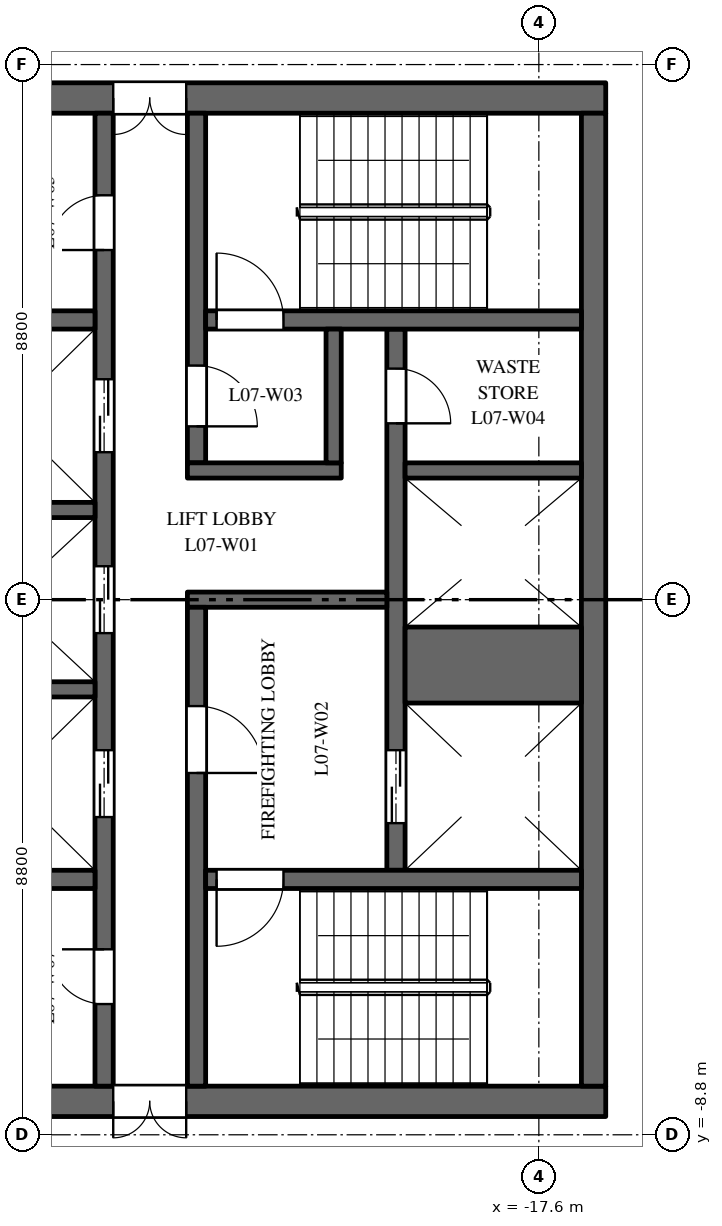
"""IFC4 building model, lengths in metres.
Left out: names, types, materials, properties, quantities, classifications, styles, units other than length and angle.
Written with IfcOpenShell. Run it as: python <this file> out.ifc"""

import sys

from ifc_helpers import new_model, si_unit, direction, frame, frame_2d, origin, place, context, subcontext, project, spatial, rectangle, extrude, element, fill, save


model = new_model("IFC4")
c1 = context("Model", 3, precision=1e-05, world=origin(), true_north=direction((0.0, 1.0)))
c2 = subcontext(c1, "Body", "Model", "MODEL_VIEW")
j1 = project(units=[si_unit("LENGTHUNIT", "METRE"), si_unit("PLANEANGLEUNIT", "RADIAN")], contexts=[c1])
p1 = place(None, origin())
s1 = spatial("IfcSite", under=j1, at=p1, CompositionType="ELEMENT")
p2 = place(p1, origin())
s2 = spatial("IfcBuilding", under=s1, at=p2, CompositionType="ELEMENT")
p3 = place(p2, frame((0.0, 0.0, 38.5)))
s3 = spatial("IfcBuildingStorey", under=s2, at=p3, CompositionType="ELEMENT", Elevation=38.5)
p4 = place(p3, frame((-16.5, 8.25, 0.0), z_axis=(0.0, 0.0, 1.0), x_axis=(-1.0, 0.0, 0.0)))
e1 = element("IfcWall", 1, at=p4, inside=s3, PredefinedType="SHEAR", context=c2, shape_type="SweptSolid", body=[
    extrude(rectangle(XDim=15.0, YDim=0.5, at=frame_2d((7.5, 0.0))), origin(), (0.0, 0.0, 1.0), 3.7),
])
p5 = place(p4, frame((6.9, 0.0, 0.0)))
e2 = element("IfcOpeningElement", 2, at=p5, cuts=e1, PredefinedType="OPENING", context=c2, shape_type="SweptSolid", body=[
    extrude(rectangle(XDim=1.2, YDim=2.1, at=frame_2d((0.6, 1.05))), frame((0.0, 0.26, 0.0), z_axis=(0.0, -1.0, 0.0), x_axis=(1.0, 0.0, 0.0)), (0.0, 0.0, 1.0), 0.52),
])
p6 = place(p4, frame((12.05, 0.0, 0.0)))
e3 = element("IfcOpeningElement", 3, at=p6, cuts=e1, PredefinedType="OPENING", context=c2, shape_type="SweptSolid", body=[
    extrude(rectangle(XDim=0.9, YDim=2.1, at=frame_2d((0.45, 1.05))), frame((0.0, 0.26, 0.0), z_axis=(0.0, -1.0, 0.0), x_axis=(1.0, 0.0, 0.0)), (0.0, 0.0, 1.0), 0.52),
])
p7 = place(p3, frame((-16.5, -8.25, 0.0), z_axis=(0.0, 0.0, 1.0), x_axis=(-1.0, 0.0, 0.0)))
e4 = element("IfcWall", 4, at=p7, inside=s3, PredefinedType="SHEAR", context=c2, shape_type="SweptSolid", body=[
    extrude(rectangle(XDim=15.0, YDim=0.5, at=frame_2d((7.5, 0.0))), origin(), (0.0, 0.0, 1.0), 3.7),
])
p8 = place(p7, frame((6.9, 0.0, 0.0)))
e5 = element("IfcOpeningElement", 5, at=p8, cuts=e4, PredefinedType="OPENING", context=c2, shape_type="SweptSolid", body=[
    extrude(rectangle(XDim=1.2, YDim=2.1, at=frame_2d((0.6, 1.05))), frame((0.0, 0.26, 0.0), z_axis=(0.0, -1.0, 0.0), x_axis=(1.0, 0.0, 0.0)), (0.0, 0.0, 1.0), 0.52),
])
p9 = place(p7, frame((12.05, 0.0, 0.0)))
e6 = element("IfcOpeningElement", 6, at=p9, cuts=e4, PredefinedType="OPENING", context=c2, shape_type="SweptSolid", body=[
    extrude(rectangle(XDim=0.9, YDim=2.1, at=frame_2d((0.45, 1.05))), frame((0.0, 0.26, 0.0), z_axis=(0.0, -1.0, 0.0), x_axis=(1.0, 0.0, 0.0)), (0.0, 0.0, 1.0), 0.52),
])
p10 = place(p3, frame((-19.95, -4.45, 0.0), z_axis=(0.0, 0.0, 1.0), x_axis=(0.0, 1.0, 0.0)))
e7 = element("IfcWall", 7, at=p10, inside=s3, PredefinedType="SHEAR", context=c2, shape_type="SweptSolid", body=[
    extrude(rectangle(XDim=8.9, YDim=0.3, at=frame_2d((4.45, 0.0))), origin(), (0.0, 0.0, 1.0), 3.7),
])
p11 = place(p10, frame((0.775, 0.0, 0.0)))
e8 = element("IfcOpeningElement", 8, at=p11, cuts=e7, PredefinedType="OPENING", context=c2, shape_type="SweptSolid", body=[
    extrude(rectangle(XDim=1.2, YDim=2.1, at=frame_2d((0.6, 1.05))), frame((0.0, 0.16, 0.0), z_axis=(0.0, -1.0, 0.0), x_axis=(1.0, 0.0, 0.0)), (0.0, 0.0, 1.0), 0.32),
])
p12 = place(p10, frame((7.35, 0.0, 0.0)))
e9 = element("IfcOpeningElement", 9, at=p12, cuts=e7, PredefinedType="OPENING", context=c2, shape_type="SweptSolid", body=[
    extrude(rectangle(XDim=0.9, YDim=2.1, at=frame_2d((0.45, 1.05))), frame((0.0, 0.16, 0.0), z_axis=(0.0, -1.0, 0.0), x_axis=(1.0, 0.0, 0.0)), (0.0, 0.0, 1.0), 0.32),
])
p13 = place(p3, frame((-24.75, -8.0, 0.0), z_axis=(0.0, 0.0, 1.0), x_axis=(0.0, 1.0, 0.0)))
e10 = element("IfcWall", 10, at=p13, inside=s3, PredefinedType="SHEAR", context=c2, shape_type="SweptSolid", body=[
    extrude(rectangle(XDim=16.0, YDim=0.3, at=frame_2d((8.0, 0.0))), origin(), (0.0, 0.0, 1.0), 3.7),
])
p14 = place(p13, frame((4.425, 0.0, 0.0)))
e11 = element("IfcOpeningElement", 11, at=p14, cuts=e10, PredefinedType="OPENING", context=c2, shape_type="SweptSolid", body=[
    extrude(rectangle(XDim=1.1, YDim=2.1, at=frame_2d((0.55, 1.05))), frame((0.0, 0.16, 0.0), z_axis=(0.0, -1.0, 0.0), x_axis=(1.0, 0.0, 0.0)), (0.0, 0.0, 1.0), 0.32),
])
p15 = place(p13, frame((7.45, 0.0, 0.0)))
e12 = element("IfcOpeningElement", 12, at=p15, cuts=e10, PredefinedType="OPENING", context=c2, shape_type="SweptSolid", body=[
    extrude(rectangle(XDim=1.1, YDim=2.1, at=frame_2d((0.55, 1.05))), frame((0.0, 0.16, 0.0), z_axis=(0.0, -1.0, 0.0), x_axis=(1.0, 0.0, 0.0)), (0.0, 0.0, 1.0), 0.32),
])
p16 = place(p13, frame((10.425, 0.0, 0.0)))
e13 = element("IfcOpeningElement", 13, at=p16, cuts=e10, PredefinedType="OPENING", context=c2, shape_type="SweptSolid", body=[
    extrude(rectangle(XDim=1.2, YDim=2.1, at=frame_2d((0.6, 1.05))), frame((0.0, 0.16, 0.0), z_axis=(0.0, -1.0, 0.0), x_axis=(1.0, 0.0, 0.0)), (0.0, 0.0, 1.0), 0.32),
])
p17 = place(p13, frame((13.75, 0.0, 0.0)))
e14 = element("IfcOpeningElement", 14, at=p17, cuts=e10, PredefinedType="OPENING", context=c2, shape_type="SweptSolid", body=[
    extrude(rectangle(XDim=0.9, YDim=2.1, at=frame_2d((0.45, 1.05))), frame((0.0, 0.16, 0.0), z_axis=(0.0, -1.0, 0.0), x_axis=(1.0, 0.0, 0.0)), (0.0, 0.0, 1.0), 0.32),
])
p18 = place(p13, frame((1.35, 0.0, 0.0)))
e15 = element("IfcOpeningElement", 15, at=p18, cuts=e10, PredefinedType="OPENING", context=c2, shape_type="SweptSolid", body=[
    extrude(rectangle(XDim=0.9, YDim=2.1, at=frame_2d((0.45, 1.05))), frame((0.0, 0.16, 0.0), z_axis=(0.0, -1.0, 0.0), x_axis=(1.0, 0.0, 0.0)), (0.0, 0.0, 1.0), 0.32),
])
p19 = place(p3, frame((-20.1, 0.0, 0.0), z_axis=(0.0, 0.0, 1.0), x_axis=(-1.0, 0.0, 0.0)))
e16 = element("IfcWall", 16, at=p19, inside=s3, PredefinedType="SHEAR", context=c2, shape_type="SweptSolid", body=[
    extrude(rectangle(XDim=3.28, YDim=0.25, at=frame_2d((1.64, 0.0))), origin(), (0.0, 0.0, 1.0), 3.7),
])
p20 = place(p3, frame((-16.7, -8.0, 0.0), z_axis=(0.0, 0.0, 1.0), x_axis=(0.0, 1.0, 0.0)))
e17 = element("IfcWall", 17, at=p20, inside=s3, PredefinedType="SHEAR", context=c2, shape_type="SweptSolid", body=[
    extrude(rectangle(XDim=16.0, YDim=0.4, at=frame_2d((8.0, 0.0))), origin(), (0.0, 0.0, 1.0), 3.7),
])
p21 = place(p3, frame((-24.9, 4.6, 0.0), z_axis=(0.0, 0.0, 1.0), x_axis=(-1.0, 0.0, 0.0)))
e18 = element("IfcWall", 18, at=p21, inside=s3, PredefinedType="SHEAR", context=c2, shape_type="SweptSolid", body=[
    extrude(rectangle(XDim=6.1, YDim=0.3, at=frame_2d((3.05, 0.0))), origin(), (0.0, 0.0, 1.0), 3.7),
])
p22 = place(p21, frame((4.2, 0.0, 0.0)))
e19 = element("IfcOpeningElement", 19, at=p22, cuts=e18, PredefinedType="OPENING", context=c2, shape_type="SweptSolid", body=[
    extrude(rectangle(XDim=0.9, YDim=2.1, at=frame_2d((0.45, 1.05))), frame((0.0, 0.16, 0.0), z_axis=(0.0, -1.0, 0.0), x_axis=(1.0, 0.0, 0.0)), (0.0, 0.0, 1.0), 0.32),
])
p23 = place(p3, frame((-24.9, -4.6, 0.0), z_axis=(0.0, 0.0, 1.0), x_axis=(-1.0, 0.0, 0.0)))
e20 = element("IfcWall", 20, at=p23, inside=s3, PredefinedType="SHEAR", context=c2, shape_type="SweptSolid", body=[
    extrude(rectangle(XDim=6.1, YDim=0.3, at=frame_2d((3.05, 0.0))), origin(), (0.0, 0.0, 1.0), 3.7),
])
p24 = place(p3, frame((-16.9, -1.075, 0.0), z_axis=(0.0, 0.0, 1.0), x_axis=(-1.0, 0.0, 0.0)))
e21 = element("IfcWall", 21, at=p24, inside=s3, PredefinedType="SHEAR", context=c2, shape_type="SweptSolid", body=[
    extrude(rectangle(XDim=2.9, YDim=1.25, at=frame_2d((1.45, 0.0))), origin(), (0.0, 0.0, 1.0), 3.7),
])
for number, where, z_axis, x_axis in (
    (22, (-16.9, 2.125, 0.0), (0.0, 0.0, 1.0), (-1.0, 0.0, 0.0)),
    (23, (-24.9, -1.475, 0.0), (0.0, 0.0, 1.0), (-1.0, 0.0, 0.0)),
    (24, (-24.9, 1.475, 0.0), (0.0, 0.0, 1.0), (-1.0, 0.0, 0.0)),
):
    element("IfcWall", number, at=place(p3, frame(where, z_axis=z_axis, x_axis=x_axis)), inside=s3, PredefinedType="SHEAR", context=c2, shape_type="SweptSolid", body=[
        extrude(rectangle(XDim=2.9, YDim=0.25, at=frame_2d((1.45, 0.0))), origin(), (0.0, 0.0, 1.0), 3.7),
    ])
p25 = place(p3, frame((-23.23, 2.25, 0.0), z_axis=(0.0, 0.0, 1.0), x_axis=(0.0, 1.0, 0.0)))
e25 = element("IfcWall", 25, at=p25, inside=s3, PredefinedType="SHEAR", context=c2, shape_type="SweptSolid", body=[
    extrude(rectangle(XDim=5.75, YDim=0.3, at=frame_2d((2.875, 0.0))), origin(), (0.0, 0.0, 1.0), 3.7),
])
p26 = place(p25, frame((0.6, 0.0, 0.0)))
e26 = element("IfcOpeningElement", 26, at=p26, cuts=e25, PredefinedType="OPENING", context=c2, shape_type="SweptSolid", body=[
    extrude(rectangle(XDim=1.0, YDim=2.1, at=frame_2d((0.5, 1.05))), frame((0.0, 0.16, 0.0), z_axis=(0.0, -1.0, 0.0), x_axis=(1.0, 0.0, 0.0)), (0.0, 0.0, 1.0), 0.32),
])
p27 = place(p3, frame((-23.23, -8.0, 0.0), z_axis=(0.0, 0.0, 1.0), x_axis=(0.0, 1.0, 0.0)))
e27 = element("IfcWall", 27, at=p27, inside=s3, PredefinedType="SHEAR", context=c2, shape_type="SweptSolid", body=[
    extrude(rectangle(XDim=7.875, YDim=0.3, at=frame_2d((3.938, 0.0))), origin(), (0.0, 0.0, 1.0), 3.7),
])
p28 = place(p27, frame((5.15, 0.0, 0.0)))
e28 = element("IfcOpeningElement", 28, at=p28, cuts=e27, PredefinedType="OPENING", context=c2, shape_type="SweptSolid", body=[
    extrude(rectangle(XDim=1.1, YDim=2.1, at=frame_2d((0.55, 1.05))), frame((0.0, 0.16, 0.0), z_axis=(0.0, -1.0, 0.0), x_axis=(1.0, 0.0, 0.0)), (0.0, 0.0, 1.0), 0.32),
])
p29 = place(p3, frame((-16.9, 4.6, 0.0), z_axis=(0.0, 0.0, 1.0), x_axis=(-1.0, 0.0, 0.0)))
e29 = element("IfcWall", 29, at=p29, inside=s3, PredefinedType="SHEAR", context=c2, shape_type="SweptSolid", body=[
    extrude(rectangle(XDim=6.18, YDim=0.3, at=frame_2d((3.09, 0.0))), origin(), (0.0, 0.0, 1.0), 3.7),
])
p30 = place(p29, frame((4.9, 0.0, 0.0)))
e30 = element("IfcOpeningElement", 30, at=p30, cuts=e29, PredefinedType="OPENING", context=c2, shape_type="SweptSolid", body=[
    extrude(rectangle(XDim=1.1, YDim=2.1, at=frame_2d((0.55, 1.05))), frame((0.0, 0.16, 0.0), z_axis=(0.0, -1.0, 0.0), x_axis=(1.0, 0.0, 0.0)), (0.0, 0.0, 1.0), 0.32),
])
p31 = place(p3, frame((-16.9, -4.6, 0.0), z_axis=(0.0, 0.0, 1.0), x_axis=(-1.0, 0.0, 0.0)))
e31 = element("IfcWall", 31, at=p31, inside=s3, PredefinedType="SHEAR", context=c2, shape_type="SweptSolid", body=[
    extrude(rectangle(XDim=6.18, YDim=0.3, at=frame_2d((3.09, 0.0))), origin(), (0.0, 0.0, 1.0), 3.7),
])
p32 = place(p31, frame((4.9, 0.0, 0.0)))
e32 = element("IfcOpeningElement", 32, at=p32, cuts=e31, PredefinedType="OPENING", context=c2, shape_type="SweptSolid", body=[
    extrude(rectangle(XDim=1.1, YDim=2.1, at=frame_2d((0.55, 1.05))), frame((0.0, 0.16, 0.0), z_axis=(0.0, -1.0, 0.0), x_axis=(1.0, 0.0, 0.0)), (0.0, 0.0, 1.0), 0.32),
])
p33 = place(p3, frame((-20.85, 2.125, 0.0), z_axis=(0.0, 0.0, 1.0), x_axis=(-1.0, 0.0, 0.0)))
e33 = element("IfcWall", 33, at=p33, inside=s3, PredefinedType="SHEAR", context=c2, shape_type="SweptSolid", body=[
    extrude(rectangle(XDim=2.53, YDim=0.25, at=frame_2d((1.265, 0.0))), origin(), (0.0, 0.0, 1.0), 3.7),
])
p34 = place(p3, frame((-20.975, 2.25, 0.0), z_axis=(0.0, 0.0, 1.0), x_axis=(0.0, 1.0, 0.0)))
e34 = element("IfcWall", 34, at=p34, inside=s3, PredefinedType="SHEAR", context=c2, shape_type="SweptSolid", body=[
    extrude(rectangle(XDim=2.2, YDim=0.25, at=frame_2d((1.1, 0.0))), origin(), (0.0, 0.0, 1.0), 3.7),
])
p35 = place(p11, origin())
e35 = element("IfcDoor", 35, at=p35, inside=s3, OperationType="DOUBLE_DOOR_SLIDING", PredefinedType="DOOR", context=c2, shape_type="SweptSolid", body=[
    extrude(rectangle(XDim=1.2, YDim=2.1, at=frame_2d((0.6, 1.05))), frame((0.0, 0.025, 0.0), z_axis=(0.0, -1.0, 0.0), x_axis=(1.0, 0.0, 0.0)), (0.0, 0.0, 1.0), 0.05),
])
fill(e8, e35)
p36 = place(p14, origin())
e36 = element("IfcDoor", 36, at=p36, inside=s3, OperationType="DOUBLE_DOOR_SLIDING", PredefinedType="DOOR", context=c2, shape_type="SweptSolid", body=[
    extrude(rectangle(XDim=1.1, YDim=2.1, at=frame_2d((0.55, 1.05))), frame((0.0, 0.025, 0.0), z_axis=(0.0, -1.0, 0.0), x_axis=(1.0, 0.0, 0.0)), (0.0, 0.0, 1.0), 0.05),
])
fill(e11, e36)
p37 = place(p15, origin())
e37 = element("IfcDoor", 37, at=p37, inside=s3, OperationType="DOUBLE_DOOR_SLIDING", PredefinedType="DOOR", context=c2, shape_type="SweptSolid", body=[
    extrude(rectangle(XDim=1.1, YDim=2.1, at=frame_2d((0.55, 1.05))), frame((0.0, 0.025, 0.0), z_axis=(0.0, -1.0, 0.0), x_axis=(1.0, 0.0, 0.0)), (0.0, 0.0, 1.0), 0.05),
])
fill(e12, e37)
p38 = place(p16, origin())
e38 = element("IfcDoor", 38, at=p38, inside=s3, OperationType="DOUBLE_DOOR_SLIDING", PredefinedType="DOOR", context=c2, shape_type="SweptSolid", body=[
    extrude(rectangle(XDim=1.2, YDim=2.1, at=frame_2d((0.6, 1.05))), frame((0.0, 0.025, 0.0), z_axis=(0.0, -1.0, 0.0), x_axis=(1.0, 0.0, 0.0)), (0.0, 0.0, 1.0), 0.05),
])
fill(e13, e38)
p39 = place(p30, origin())
e39 = element("IfcDoor", 39, at=p39, inside=s3, OperationType="SINGLE_SWING_RIGHT", PredefinedType="DOOR", context=c2, shape_type="SweptSolid", body=[
    extrude(rectangle(XDim=1.1, YDim=2.1, at=frame_2d((0.55, 1.05))), frame((0.0, 0.025, 0.0), z_axis=(0.0, -1.0, 0.0), x_axis=(1.0, 0.0, 0.0)), (0.0, 0.0, 1.0), 0.05),
])
fill(e30, e39)
p40 = place(p32, origin())
e40 = element("IfcDoor", 40, at=p40, inside=s3, OperationType="SINGLE_SWING_LEFT", PredefinedType="DOOR", context=c2, shape_type="SweptSolid", body=[
    extrude(rectangle(XDim=1.1, YDim=2.1, at=frame_2d((0.55, 1.05))), frame((0.0, 0.025, 0.0), z_axis=(0.0, -1.0, 0.0), x_axis=(1.0, 0.0, 0.0)), (0.0, 0.0, 1.0), 0.05),
])
fill(e32, e40)
p41 = place(p28, origin())
e41 = element("IfcDoor", 41, at=p41, inside=s3, OperationType="SINGLE_SWING_LEFT", PredefinedType="DOOR", context=c2, shape_type="SweptSolid", body=[
    extrude(rectangle(XDim=1.1, YDim=2.1, at=frame_2d((0.55, 1.05))), frame((0.0, 0.025, 0.0), z_axis=(0.0, -1.0, 0.0), x_axis=(1.0, 0.0, 0.0)), (0.0, 0.0, 1.0), 0.05),
])
fill(e28, e41)
p42 = place(p26, origin())
e42 = element("IfcDoor", 42, at=p42, inside=s3, OperationType="SINGLE_SWING_LEFT", PredefinedType="DOOR", context=c2, shape_type="SweptSolid", body=[
    extrude(rectangle(XDim=1.0, YDim=2.1, at=frame_2d((0.5, 1.05))), frame((0.0, 0.025, 0.0), z_axis=(0.0, -1.0, 0.0), x_axis=(1.0, 0.0, 0.0)), (0.0, 0.0, 1.0), 0.05),
])
fill(e26, e42)
p43 = place(p5, origin())
e43 = element("IfcDoor", 43, at=p43, inside=s3, OperationType="DOUBLE_DOOR_DOUBLE_SWING", PredefinedType="DOOR", context=c2, shape_type="SweptSolid", body=[
    extrude(rectangle(XDim=1.2, YDim=2.1, at=frame_2d((0.6, 1.05))), frame((0.0, 0.025, 0.0), z_axis=(0.0, -1.0, 0.0), x_axis=(1.0, 0.0, 0.0)), (0.0, 0.0, 1.0), 0.05),
])
fill(e2, e43)
p44 = place(p8, origin())
e44 = element("IfcDoor", 44, at=p44, inside=s3, OperationType="DOUBLE_DOOR_DOUBLE_SWING", PredefinedType="DOOR", context=c2, shape_type="SweptSolid", body=[
    extrude(rectangle(XDim=1.2, YDim=2.1, at=frame_2d((0.6, 1.05))), frame((0.0, 0.025, 0.0), z_axis=(0.0, -1.0, 0.0), x_axis=(1.0, 0.0, 0.0)), (0.0, 0.0, 1.0), 0.05),
])
fill(e5, e44)
p45 = place(p12, origin())
e45 = element("IfcDoor", 45, at=p45, inside=s3, OperationType="SINGLE_SWING_LEFT", PredefinedType="DOOR", context=c2, shape_type="SweptSolid", body=[
    extrude(rectangle(XDim=0.9, YDim=2.1, at=frame_2d((0.45, 1.05))), frame((0.0, 0.025, 0.0), z_axis=(0.0, -1.0, 0.0), x_axis=(1.0, 0.0, 0.0)), (0.0, 0.0, 1.0), 0.05),
])
fill(e9, e45)
p46 = place(p17, origin())
e46 = element("IfcDoor", 46, at=p46, inside=s3, OperationType="SINGLE_SWING_RIGHT", PredefinedType="DOOR", context=c2, shape_type="SweptSolid", body=[
    extrude(rectangle(XDim=0.9, YDim=2.1, at=frame_2d((0.45, 1.05))), frame((0.0, 0.025, 0.0), z_axis=(0.0, -1.0, 0.0), x_axis=(1.0, 0.0, 0.0)), (0.0, 0.0, 1.0), 0.05),
])
fill(e14, e46)
p47 = place(p18, origin())
e47 = element("IfcDoor", 47, at=p47, inside=s3, OperationType="SINGLE_SWING_LEFT", PredefinedType="DOOR", context=c2, shape_type="SweptSolid", body=[
    extrude(rectangle(XDim=0.9, YDim=2.1, at=frame_2d((0.45, 1.05))), frame((0.0, 0.025, 0.0), z_axis=(0.0, -1.0, 0.0), x_axis=(1.0, 0.0, 0.0)), (0.0, 0.0, 1.0), 0.05),
])
fill(e15, e47)
save(model, sys.argv[1])
